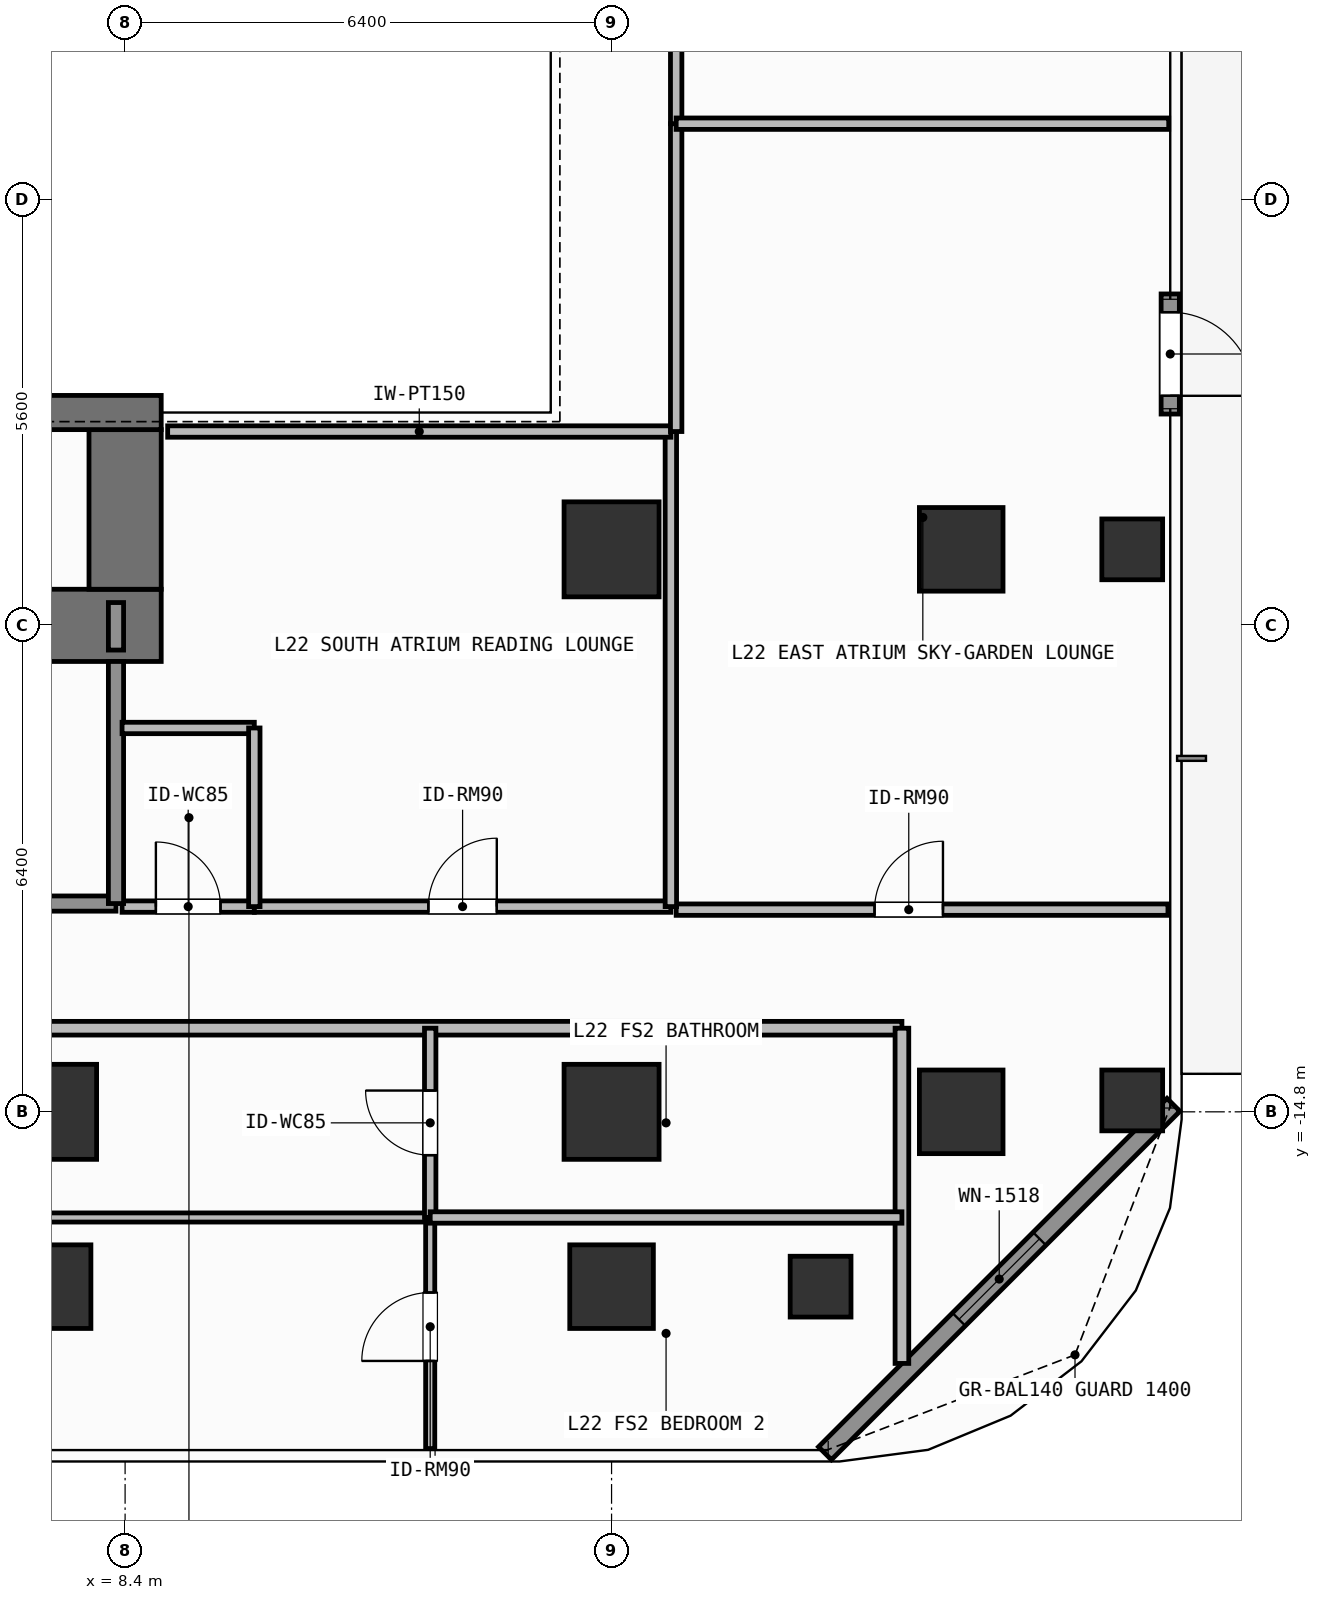
"""IFC4 building model, lengths in metres.
Left out: names, types, materials, properties, quantities, classifications, styles, units other than length and angle.
Written with IfcOpenShell. Run it as: python <this file> out.ifc"""

import sys

from ifc_helpers import new_model, si_unit, direction, frame, frame_2d, origin, origin_2d, place, context, subcontext, project, spatial, rectangle, hollow_rectangle, extrude, element, fill, save


model = new_model("IFC4")
c1 = context("Model", 3, precision=1e-05, world=origin(), true_north=direction((0.0, 1.0)))
c2 = subcontext(c1, "Body", "Model", "MODEL_VIEW")
j1 = project(units=[si_unit("LENGTHUNIT", "METRE"), si_unit("PLANEANGLEUNIT", "RADIAN")], contexts=[c1])
p1 = place(None, origin())
s1 = spatial("IfcSite", under=j1, at=p1, CompositionType="ELEMENT")
p2 = place(p1, origin())
s2 = spatial("IfcBuilding", under=s1, at=p2, CompositionType="ELEMENT")
p3 = place(p2, frame((0.0, 0.0, 89.1)))
s3 = spatial("IfcBuildingStorey", under=s2, at=p3, CompositionType="ELEMENT", Elevation=89.1)
p4 = place(p3, frame((6.12, -8.4, 0.0), z_axis=(0.0, 0.0, 1.0), x_axis=(1.0, 0.0, 0.0)))
e1 = element("IfcWall", 1, at=p4, inside=s3, PredefinedType="SHEAR", context=c2, shape_type="SweptSolid", body=[
    extrude(rectangle(XDim=2.755, YDim=0.95, at=frame_2d((1.377, 0.0))), origin(), (0.0, 0.0, 1.0), 3.9),
])
p5 = place(p3, frame((8.4, -7.925, 0.0), z_axis=(0.0, 0.0, 1.0), x_axis=(0.0, 1.0, 0.0)))
e2 = element("IfcWall", 2, at=p5, inside=s3, PredefinedType="SHEAR", context=c2, shape_type="SweptSolid", body=[
    extrude(rectangle(XDim=2.1, YDim=0.95, at=frame_2d((1.05, 0.0))), origin(), (0.0, 0.0, 1.0), 3.9),
])
p6 = place(p3, frame((3.045, -5.6, 0.0), z_axis=(0.0, 0.0, 1.0), x_axis=(1.0, 0.0, 0.0)))
e3 = element("IfcWall", 3, at=p6, inside=s3, PredefinedType="SHEAR", context=c2, shape_type="SweptSolid", body=[
    extrude(rectangle(XDim=5.83, YDim=0.45, at=frame_2d((2.915, 0.0))), origin(), (0.0, 0.0, 1.0), 3.9),
])
for number, where, z_axis, x_axis in (
    (4, (7.4, -14.8, 0.0), (0.0, 0.0, 1.0), (1.0, 0.0, 0.0)),
    (5, (14.8, -14.8, 0.0), (0.0, 0.0, 1.0), (1.0, 0.0, 0.0)),
    (6, (14.8, -7.4, 0.0), (0.0, 0.0, 1.0), (1.0, 0.0, 0.0)),
):
    element("IfcColumn", number, at=place(p3, frame(where, z_axis=z_axis, x_axis=x_axis)), inside=s3, PredefinedType="COLUMN", context=c2, shape_type="SweptSolid", body=[
        extrude(rectangle(XDim=1.25, YDim=1.25, at=origin_2d()), origin(), (0.0, 0.0, 1.0), 3.9),
    ])
for number, where, z_axis, x_axis in (
    (7, (19.4, -14.8, 0.0), (0.0, 0.0, 1.0), (1.0, 0.0, 0.0)),
    (8, (19.4, -7.4, 0.0), (0.0, 0.0, 1.0), (1.0, 0.0, 0.0)),
    (9, (7.4, -17.1, 0.0), (0.0, 0.0, 1.0), (1.0, 0.0, 0.0)),
    (10, (14.8, -17.1, 0.0), (0.0, 0.0, 1.0), (1.0, 0.0, 0.0)),
):
    element("IfcColumn", number, at=place(p3, frame(where, z_axis=z_axis, x_axis=x_axis)), inside=s3, PredefinedType="COLUMN", context=c2, shape_type="SweptSolid", body=[
        extrude(rectangle(XDim=1.1, YDim=1.1, at=origin_2d()), origin(), (0.0, 0.0, 1.0), 3.9),
    ])
for number, where, z_axis, x_axis in (
    (11, (17.55, -17.1, 0.0), (0.0, 0.0, 1.0), (1.0, 0.0, 0.0)),
    (12, (21.65, -14.65, 0.0), (0.0, 0.0, 1.0), (1.0, 0.0, 0.0)),
    (13, (21.65, -7.4, 0.0), (0.0, 0.0, 1.0), (1.0, 0.0, 0.0)),
):
    element("IfcColumn", number, at=place(p3, frame(where, z_axis=z_axis, x_axis=x_axis)), inside=s3, PredefinedType="COLUMN", context=c2, shape_type="SweptSolid", body=[
        extrude(hollow_rectangle(XDim=0.8, YDim=0.8, WallThickness=0.036, at=origin_2d()), origin(), (0.0, 0.0, 1.0), 3.9),
    ])
p7 = place(p3, frame((22.15, -4.04, 0.0), z_axis=(0.0, 0.0, 1.0), x_axis=(0.0, -1.0, 0.0)))
e14 = element("IfcWall", 14, at=p7, inside=s3, PredefinedType="SOLIDWALL", context=c2, shape_type="SweptSolid", body=[
    extrude(rectangle(XDim=1.58, YDim=0.24, at=frame_2d((0.79, 0.0))), origin(), (0.0, 0.0, 1.0), 3.68),
])
p8 = place(p7, frame((0.24, 0.0, 0.0)))
e15 = element("IfcOpeningElement", 15, at=p8, cuts=e14, PredefinedType="OPENING", context=c2, shape_type="SweptSolid", body=[
    extrude(rectangle(XDim=1.1, YDim=2.2, at=frame_2d((0.55, 1.1))), frame((0.0, 0.13, 0.0), z_axis=(0.0, -1.0, 0.0), x_axis=(1.0, 0.0, 0.0)), (0.0, 0.0, 1.0), 0.26),
])
p9 = place(p3, frame((22.192, -14.708, 0.0), z_axis=(0.0, 0.0, 1.0), x_axis=(-0.707087954376, -0.707125607496, 0.0)))
e16 = element("IfcWall", 16, at=p9, inside=s3, PredefinedType="SOLIDWALL", context=c2, shape_type="SweptSolid", body=[
    extrude(rectangle(XDim=6.484, YDim=0.24, at=frame_2d((3.242, 0.0))), origin(), (0.0, 0.0, 1.0), 3.68),
])
p10 = place(p9, frame((2.492, 0.0, 0.8)))
e17 = element("IfcOpeningElement", 17, at=p10, cuts=e16, PredefinedType="OPENING", context=c2, shape_type="SweptSolid", body=[
    extrude(rectangle(XDim=1.5, YDim=1.85, at=frame_2d((0.75, 0.925))), frame((0.0, 0.13, 0.0), z_axis=(0.0, -1.0, 0.0), x_axis=(1.0, 0.0, 0.0)), (0.0, 0.0, 1.0), 0.26),
])
p11 = place(p3, frame((4.58, -12.06, 0.0), z_axis=(0.0, 0.0, 1.0), x_axis=(1.0, 0.0, 0.0)))
e18 = element("IfcWall", 18, at=p11, inside=s3, PredefinedType="SOLIDWALL", context=c2, shape_type="SweptSolid", body=[
    extrude(rectangle(XDim=3.7, YDim=0.2, at=frame_2d((1.85, 0.0))), origin(), (0.0, 0.0, 1.0), 3.68),
])
p12 = place(p11, frame((1.212, 0.0, 0.0)))
e19 = element("IfcOpeningElement", 19, at=p12, cuts=e18, PredefinedType="OPENING", context=c2, shape_type="SweptSolid", body=[
    extrude(rectangle(XDim=1.1, YDim=2.15, at=frame_2d((0.55, 1.075))), frame((0.0, 0.11, 0.0), z_axis=(0.0, -1.0, 0.0), x_axis=(1.0, 0.0, 0.0)), (0.0, 0.0, 1.0), 0.22),
])
p13 = place(p3, frame((8.36, -12.1, 0.0), z_axis=(0.0, 0.0, 1.0), x_axis=(1.0, 0.0, 0.0)))
e20 = element("IfcWall", 20, at=p13, inside=s3, PredefinedType="PARTITIONING", context=c2, shape_type="SweptSolid", body=[
    extrude(rectangle(XDim=1.74, YDim=0.15, at=frame_2d((0.87, 0.0))), origin(), (0.0, 0.0, 1.0), 3.68),
])
p14 = place(p13, frame((0.445, 0.0, 0.0)))
e21 = element("IfcOpeningElement", 21, at=p14, cuts=e20, PredefinedType="OPENING", context=c2, shape_type="SweptSolid", body=[
    extrude(rectangle(XDim=0.85, YDim=2.1, at=frame_2d((0.425, 1.05))), frame((0.0, 0.085, 0.0), z_axis=(0.0, -1.0, 0.0), x_axis=(1.0, 0.0, 0.0)), (0.0, 0.0, 1.0), 0.17),
])
p15 = place(p3, frame((10.1, -12.1, 0.0), z_axis=(0.0, 0.0, 1.0), x_axis=(1.0, 0.0, 0.0)))
e22 = element("IfcWall", 22, at=p15, inside=s3, PredefinedType="PARTITIONING", context=c2, shape_type="SweptSolid", body=[
    extrude(rectangle(XDim=5.48, YDim=0.15, at=frame_2d((2.74, 0.0))), origin(), (0.0, 0.0, 1.0), 3.68),
])
p16 = place(p15, frame((2.29, 0.0, 0.0)))
e23 = element("IfcOpeningElement", 23, at=p16, cuts=e22, PredefinedType="OPENING", context=c2, shape_type="SweptSolid", body=[
    extrude(rectangle(XDim=0.9, YDim=2.1, at=frame_2d((0.45, 1.05))), frame((0.0, 0.085, 0.0), z_axis=(0.0, -1.0, 0.0), x_axis=(1.0, 0.0, 0.0)), (0.0, 0.0, 1.0), 0.17),
])
p17 = place(p3, frame((-7.634, -13.7, 0.0), z_axis=(0.0, 0.0, 1.0), x_axis=(1.0, 0.0, 0.0)))
e24 = element("IfcWall", 24, at=p17, inside=s3, PredefinedType="PARTITIONING", context=c2, shape_type="SweptSolid", body=[
    extrude(rectangle(XDim=26.254, YDim=0.18, at=frame_2d((13.127, 0.0))), origin(), (0.0, 0.0, 1.0), 3.68),
])
p18 = place(p17, frame((12.178, 0.0, 0.0)))
e25 = element("IfcOpeningElement", 25, at=p18, cuts=e24, PredefinedType="OPENING", context=c2, shape_type="SweptSolid", body=[
    extrude(rectangle(XDim=1.0, YDim=2.2, at=frame_2d((0.5, 1.1))), frame((0.0, 0.1, 0.0), z_axis=(0.0, -1.0, 0.0), x_axis=(1.0, 0.0, 0.0)), (0.0, 0.0, 1.0), 0.2),
])
p19 = place(p3, frame((-2.24, -16.19, 0.0), z_axis=(0.0, 0.0, 1.0), x_axis=(1.0, 0.0, 0.0)))
e26 = element("IfcWall", 26, at=p19, inside=s3, PredefinedType="PARTITIONING", context=c2, shape_type="SweptSolid", body=[
    extrude(rectangle(XDim=14.654, YDim=0.12, at=frame_2d((7.327, 0.0))), origin(), (0.0, 0.0, 1.0), 3.68),
])
p20 = place(p19, frame((6.787, 0.0, 0.0)))
e27 = element("IfcOpeningElement", 27, at=p20, cuts=e26, PredefinedType="OPENING", context=c2, shape_type="SweptSolid", body=[
    extrude(rectangle(XDim=0.9, YDim=2.1, at=frame_2d((0.45, 1.05))), frame((0.0, 0.07, 0.0), z_axis=(0.0, -1.0, 0.0), x_axis=(1.0, 0.0, 0.0)), (0.0, 0.0, 1.0), 0.14),
])
p21 = place(p3, frame((12.414, -16.19, 0.0), z_axis=(0.0, 0.0, 1.0), x_axis=(0.0, 1.0, 0.0)))
e28 = element("IfcWall", 28, at=p21, inside=s3, PredefinedType="PARTITIONING", context=c2, shape_type="SweptSolid", body=[
    extrude(rectangle(XDim=2.49, YDim=0.15, at=frame_2d((1.245, 0.0))), origin(), (0.0, 0.0, 1.0), 3.68),
])
p22 = place(p21, frame((0.82, 0.0, 0.0)))
e29 = element("IfcOpeningElement", 29, at=p22, cuts=e28, PredefinedType="OPENING", context=c2, shape_type="SweptSolid", body=[
    extrude(rectangle(XDim=0.85, YDim=2.1, at=frame_2d((0.425, 1.05))), frame((0.0, 0.085, 0.0), z_axis=(0.0, -1.0, 0.0), x_axis=(1.0, 0.0, 0.0)), (0.0, 0.0, 1.0), 0.17),
])
p23 = place(p3, frame((12.414, -19.23, 0.0), z_axis=(0.0, 0.0, 1.0), x_axis=(0.0, 1.0, 0.0)))
e30 = element("IfcWall", 30, at=p23, inside=s3, PredefinedType="PARTITIONING", context=c2, shape_type="SweptSolid", body=[
    extrude(rectangle(XDim=3.04, YDim=0.12, at=frame_2d((1.52, 0.0))), origin(), (0.0, 0.0, 1.0), 3.68),
])
p24 = place(p23, frame((1.153, 0.0, 0.0)))
e31 = element("IfcOpeningElement", 31, at=p24, cuts=e30, PredefinedType="OPENING", context=c2, shape_type="SweptSolid", body=[
    extrude(rectangle(XDim=0.9, YDim=2.1, at=frame_2d((0.45, 1.05))), frame((0.0, 0.07, 0.0), z_axis=(0.0, -1.0, 0.0), x_axis=(1.0, 0.0, 0.0)), (0.0, 0.0, 1.0), 0.14),
])
p25 = place(p3, frame((15.65, -12.14, 0.0), z_axis=(0.0, 0.0, 1.0), x_axis=(1.0, 0.0, 0.0)))
e32 = element("IfcWall", 32, at=p25, inside=s3, PredefinedType="PARTITIONING", context=c2, shape_type="SweptSolid", body=[
    extrude(rectangle(XDim=6.47, YDim=0.15, at=frame_2d((3.235, 0.0))), origin(), (0.0, 0.0, 1.0), 3.68),
])
p26 = place(p25, frame((2.61, 0.0, 0.0)))
e33 = element("IfcOpeningElement", 33, at=p26, cuts=e32, PredefinedType="OPENING", context=c2, shape_type="SweptSolid", body=[
    extrude(rectangle(XDim=0.9, YDim=2.1, at=frame_2d((0.45, 1.05))), frame((0.0, 0.085, 0.0), z_axis=(0.0, -1.0, 0.0), x_axis=(1.0, 0.0, 0.0)), (0.0, 0.0, 1.0), 0.17),
])
p27 = place(p3, frame((8.28, -12.06, 0.0), z_axis=(0.0, 0.0, 1.0), x_axis=(0.0, 1.0, 0.0)))
e34 = element("IfcWall", 34, at=p27, inside=s3, PredefinedType="SOLIDWALL", context=c2, shape_type="SweptSolid", body=[
    extrude(rectangle(XDim=3.185, YDim=0.2, at=frame_2d((1.593, 0.0))), origin(), (0.0, 0.0, 1.0), 3.68),
])
p28 = place(p3, frame((8.28, -8.725, 0.0), z_axis=(0.0, 0.0, 1.0), x_axis=(0.0, 1.0, 0.0)))
e35 = element("IfcWall", 35, at=p28, inside=s3, PredefinedType="SOLIDWALL", context=c2, shape_type="SweptSolid", body=[
    extrude(rectangle(XDim=0.625, YDim=0.2, at=frame_2d((0.312, 0.0))), origin(), (0.0, 0.0, 1.0), 3.68),
])
p29 = place(p3, frame((8.36, -9.75, 0.0), z_axis=(0.0, 0.0, 1.0), x_axis=(1.0, 0.0, 0.0)))
e36 = element("IfcWall", 36, at=p29, inside=s3, PredefinedType="PARTITIONING", context=c2, shape_type="SweptSolid", body=[
    extrude(rectangle(XDim=1.74, YDim=0.15, at=frame_2d((0.87, 0.0))), origin(), (0.0, 0.0, 1.0), 3.68),
])
p30 = place(p3, frame((10.1, -12.1, 0.0), z_axis=(0.0, 0.0, 1.0), x_axis=(0.0, 1.0, 0.0)))
e37 = element("IfcWall", 37, at=p30, inside=s3, PredefinedType="PARTITIONING", context=c2, shape_type="SweptSolid", body=[
    extrude(rectangle(XDim=2.35, YDim=0.15, at=frame_2d((1.175, 0.0))), origin(), (0.0, 0.0, 1.0), 3.68),
])
p31 = place(p3, frame((15.58, -12.1, 0.0), z_axis=(0.0, 0.0, 1.0), x_axis=(0.0, 1.0, 0.0)))
e38 = element("IfcWall", 38, at=p31, inside=s3, PredefinedType="PARTITIONING", context=c2, shape_type="SweptSolid", body=[
    extrude(rectangle(XDim=6.25, YDim=0.15, at=frame_2d((3.125, 0.0))), origin(), (0.0, 0.0, 1.0), 3.68),
])
p32 = place(p3, frame((8.96, -5.85, 0.0), z_axis=(0.0, 0.0, 1.0), x_axis=(1.0, 0.0, 0.0)))
e39 = element("IfcWall", 39, at=p32, inside=s3, PredefinedType="PARTITIONING", context=c2, shape_type="SweptSolid", body=[
    extrude(rectangle(XDim=6.62, YDim=0.15, at=frame_2d((3.31, 0.0))), origin(), (0.0, 0.0, 1.0), 3.68),
])
p33 = place(p3, frame((18.62, -18.11, 0.0), z_axis=(0.0, 0.0, 1.0), x_axis=(0.0, 1.0, 0.0)))
e40 = element("IfcWall", 40, at=p33, inside=s3, PredefinedType="PARTITIONING", context=c2, shape_type="SweptSolid", body=[
    extrude(rectangle(XDim=4.41, YDim=0.18, at=frame_2d((2.205, 0.0))), origin(), (0.0, 0.0, 1.0), 3.68),
])
p34 = place(p3, frame((12.414, -16.19, 0.0), z_axis=(0.0, 0.0, 1.0), x_axis=(1.0, 0.0, 0.0)))
e41 = element("IfcWall", 41, at=p34, inside=s3, PredefinedType="PARTITIONING", context=c2, shape_type="SweptSolid", body=[
    extrude(rectangle(XDim=6.206, YDim=0.15, at=frame_2d((3.103, 0.0))), origin(), (0.0, 0.0, 1.0), 3.68),
])
p35 = place(p3, frame((15.65, -5.85, 0.0), z_axis=(0.0, 0.0, 1.0), x_axis=(0.0, 1.0, 0.0)))
e42 = element("IfcWall", 42, at=p35, inside=s3, PredefinedType="PARTITIONING", context=c2, shape_type="SweptSolid", body=[
    extrude(rectangle(XDim=4.05, YDim=0.15, at=frame_2d((2.025, 0.0))), origin(), (0.0, 0.0, 1.0), 3.68),
])
p36 = place(p3, frame((15.65, -1.8, 0.0), z_axis=(0.0, 0.0, 1.0), x_axis=(0.0, 1.0, 0.0)))
e43 = element("IfcWall", 43, at=p36, inside=s3, PredefinedType="PARTITIONING", context=c2, shape_type="SweptSolid", body=[
    extrude(rectangle(XDim=7.65, YDim=0.15, at=frame_2d((3.825, 0.0))), origin(), (0.0, 0.0, 1.0), 3.68),
])
p37 = place(p3, frame((15.65, -1.8, 0.0), z_axis=(0.0, 0.0, 1.0), x_axis=(1.0, 0.0, 0.0)))
e44 = element("IfcWall", 44, at=p37, inside=s3, PredefinedType="PARTITIONING", context=c2, shape_type="SweptSolid", body=[
    extrude(rectangle(XDim=6.48, YDim=0.15, at=frame_2d((3.24, 0.0))), origin(), (0.0, 0.0, 1.0), 3.68),
])
p38 = place(p8, origin())
e45 = element("IfcDoor", 45, at=p38, inside=s3, OperationType="SINGLE_SWING_RIGHT", PredefinedType="DOOR", context=c2, shape_type="SweptSolid", body=[
    extrude(rectangle(XDim=1.1, YDim=2.2, at=frame_2d((0.55, 1.1))), frame((0.0, 0.025, 0.0), z_axis=(0.0, -1.0, 0.0), x_axis=(1.0, 0.0, 0.0)), (0.0, 0.0, 1.0), 0.05),
])
fill(e15, e45)
p39 = place(p10, origin())
e46 = element("IfcWindow", 46, at=p39, inside=s3, PartitioningType="SINGLE_PANEL", PredefinedType="WINDOW", context=c2, shape_type="SweptSolid", body=[
    extrude(rectangle(XDim=1.5, YDim=1.85, at=frame_2d((0.75, 0.925))), frame((0.0, 0.03, 0.0), z_axis=(0.0, -1.0, 0.0), x_axis=(1.0, 0.0, 0.0)), (0.0, 0.0, 1.0), 0.06),
])
fill(e17, e46)
p40 = place(p14, origin())
e47 = element("IfcDoor", 47, at=p40, inside=s3, OperationType="SINGLE_SWING_LEFT", PredefinedType="DOOR", context=c2, shape_type="SweptSolid", body=[
    extrude(rectangle(XDim=0.85, YDim=2.1, at=frame_2d((0.425, 1.05))), frame((0.0, 0.025, 0.0), z_axis=(0.0, -1.0, 0.0), x_axis=(1.0, 0.0, 0.0)), (0.0, 0.0, 1.0), 0.05),
])
fill(e21, e47)
p41 = place(p16, origin())
e48 = element("IfcDoor", 48, at=p41, inside=s3, OperationType="SINGLE_SWING_RIGHT", PredefinedType="DOOR", context=c2, shape_type="SweptSolid", body=[
    extrude(rectangle(XDim=0.9, YDim=2.1, at=frame_2d((0.45, 1.05))), frame((0.0, 0.025, 0.0), z_axis=(0.0, -1.0, 0.0), x_axis=(1.0, 0.0, 0.0)), (0.0, 0.0, 1.0), 0.05),
])
fill(e23, e48)
p42 = place(p22, origin())
e49 = element("IfcDoor", 49, at=p42, inside=s3, OperationType="SINGLE_SWING_RIGHT", PredefinedType="DOOR", context=c2, shape_type="SweptSolid", body=[
    extrude(rectangle(XDim=0.85, YDim=2.1, at=frame_2d((0.425, 1.05))), frame((0.0, 0.025, 0.0), z_axis=(0.0, -1.0, 0.0), x_axis=(1.0, 0.0, 0.0)), (0.0, 0.0, 1.0), 0.05),
])
fill(e29, e49)
p43 = place(p24, origin())
e50 = element("IfcDoor", 50, at=p43, inside=s3, OperationType="SINGLE_SWING_LEFT", PredefinedType="DOOR", context=c2, shape_type="SweptSolid", body=[
    extrude(rectangle(XDim=0.9, YDim=2.1, at=frame_2d((0.45, 1.05))), frame((0.0, 0.025, 0.0), z_axis=(0.0, -1.0, 0.0), x_axis=(1.0, 0.0, 0.0)), (0.0, 0.0, 1.0), 0.05),
])
fill(e31, e50)
p44 = place(p26, origin())
e51 = element("IfcDoor", 51, at=p44, inside=s3, OperationType="SINGLE_SWING_RIGHT", PredefinedType="DOOR", context=c2, shape_type="SweptSolid", body=[
    extrude(rectangle(XDim=0.9, YDim=2.1, at=frame_2d((0.45, 1.05))), frame((0.0, 0.025, 0.0), z_axis=(0.0, -1.0, 0.0), x_axis=(1.0, 0.0, 0.0)), (0.0, 0.0, 1.0), 0.05),
])
fill(e33, e51)
save(model, sys.argv[1])
